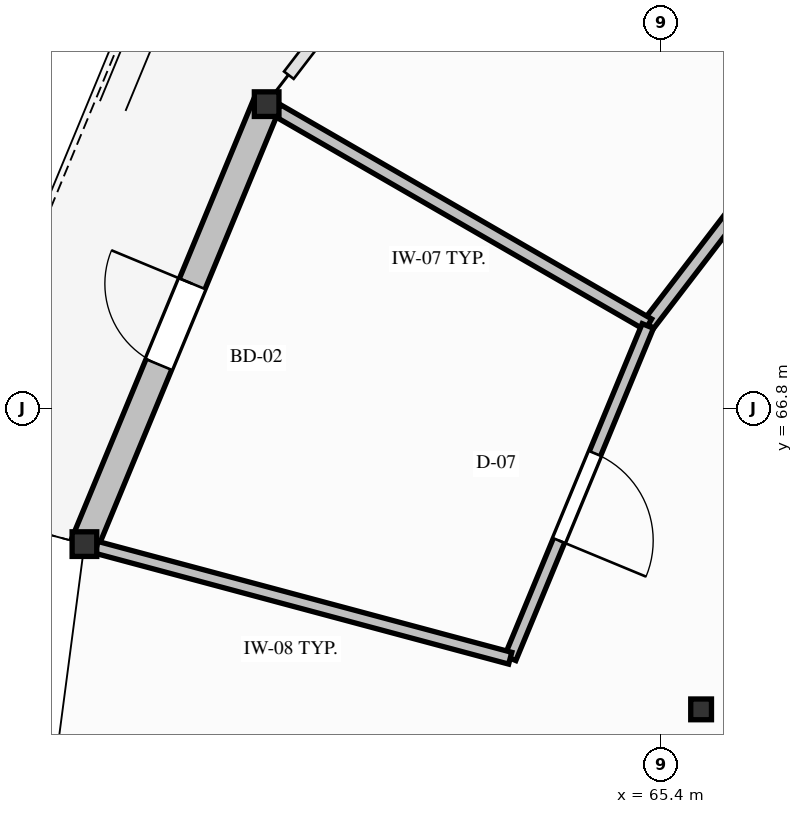
"""IFC4 building model, lengths in metres.
Left out: names, types, materials, properties, quantities, classifications, styles, units other than length and angle.
Written with IfcOpenShell. Run it as: python <this file> out.ifc"""

import sys

from ifc_helpers import new_model, si_unit, direction, frame, frame_2d, origin, origin_2d, place, context, subcontext, project, spatial, rectangle, hollow_circle, extrude, element, fill, save


model = new_model("IFC4")
c1 = context("Model", 3, precision=1e-05, world=origin(), true_north=direction((0.0, 1.0)))
c2 = subcontext(c1, "Body", "Model", "MODEL_VIEW")
j1 = project(units=[si_unit("LENGTHUNIT", "METRE"), si_unit("PLANEANGLEUNIT", "RADIAN")], contexts=[c1])
p1 = place(None, origin())
s1 = spatial("IfcSite", under=j1, at=p1, CompositionType="ELEMENT")
p2 = place(p1, origin())
s2 = spatial("IfcBuilding", under=s1, at=p2, CompositionType="ELEMENT")
p3 = place(p2, frame((0.0, 0.0, 9.0)))
s3 = spatial("IfcBuildingStorey", under=s2, at=p3, CompositionType="ELEMENT", Elevation=9.0)
for number, where, z_axis, x_axis in (
    (1, (60.215, 70.8, 0.0), (0.0, 0.0, 1.0), (1.0, 0.0, 0.0)),
    (2, (57.818, 65.012, 0.0), (0.0, 0.0, 1.0), (1.0, 0.0, 0.0)),
):
    element("IfcColumn", number, at=place(p3, frame(where, z_axis=z_axis, x_axis=x_axis)), inside=s3, PredefinedType="COLUMN", context=c2, shape_type="SweptSolid", body=[
        extrude(hollow_circle(Radius=0.162, WallThickness=0.016, at=origin_2d()), origin(), (0.0, 0.0, 1.0), 4.2),
    ])
p4 = place(p3, frame((65.932, 62.838, 0.0), z_axis=(0.0, 0.0, 1.0), x_axis=(1.0, 0.0, 0.0)))
e3 = element("IfcColumn", 3, at=p4, inside=s3, PredefinedType="COLUMN", context=c2, shape_type="SweptSolid", body=[
    extrude(hollow_circle(Radius=0.136, WallThickness=0.012, at=origin_2d()), origin(), (0.0, 0.0, 1.0), 4.2),
])
p5 = place(p3, frame((57.818, 65.012, 0.0), z_axis=(0.0, 0.0, 1.0), x_axis=(0.382663829839, 0.9238876519, 0.0)))
e4 = element("IfcWall", 4, at=p5, inside=s3, PredefinedType="SOLIDWALL", context=c2, shape_type="SweptSolid", body=[
    extrude(rectangle(XDim=6.265, YDim=0.365, at=frame_2d((3.133, 0.0))), origin(), (0.0, 0.0, 1.0), 3.538),
])
p6 = place(p5, frame((2.558, 0.0, 0.0)))
e5 = element("IfcOpeningElement", 5, at=p6, cuts=e4, PredefinedType="OPENING", context=c2, shape_type="SweptSolid", body=[
    extrude(rectangle(XDim=1.15, YDim=2.2, at=frame_2d((0.575, 1.1))), frame((0.0, 0.192, 0.0), z_axis=(0.0, -1.0, 0.0), x_axis=(1.0, 0.0, 0.0)), (0.0, 0.0, 1.0), 0.385),
])
p7 = place(p3, frame((68.131, 71.669, 0.0), z_axis=(0.0, 0.0, 1.0), x_axis=(-0.608769147025, -0.793347417989, 0.0)))
e6 = element("IfcWall", 6, at=p7, inside=s3, PredefinedType="PARTITIONING", context=c2, shape_type="SweptSolid", body=[
    extrude(rectangle(XDim=4.751, YDim=0.17, at=frame_2d((2.375, 0.0))), origin(), (0.0, 0.0, 1.0), 3.568),
])
p8 = place(p7, frame((1.826, 0.0, 0.0)))
e7 = element("IfcOpeningElement", 7, at=p8, cuts=e6, PredefinedType="OPENING", context=c2, shape_type="SweptSolid", body=[
    extrude(rectangle(XDim=1.18, YDim=2.2, at=frame_2d((0.59, 1.1))), frame((0.0, 0.095, 0.0), z_axis=(0.0, -1.0, 0.0), x_axis=(1.0, 0.0, 0.0)), (0.0, 0.0, 1.0), 0.19),
])
p9 = place(p3, frame((65.238, 67.9, 0.0), z_axis=(0.0, 0.0, 1.0), x_axis=(-0.866013897511, 0.50001992892, 0.0)))
e8 = element("IfcWall", 8, at=p9, inside=s3, PredefinedType="PARTITIONING", context=c2, shape_type="SweptSolid", body=[
    extrude(rectangle(XDim=5.636, YDim=0.17, at=frame_2d((2.818, 0.0))), origin(), (0.0, 0.0, 1.0), 3.538),
])
p10 = place(p3, frame((65.231, 67.881, 0.0), z_axis=(0.0, 0.0, 1.0), x_axis=(-0.382698170162, -0.923873427778, 0.0)))
e9 = element("IfcWall", 9, at=p10, inside=s3, PredefinedType="PARTITIONING", context=c2, shape_type="SweptSolid", body=[
    extrude(rectangle(XDim=4.731, YDim=0.16, at=frame_2d((2.365, 0.0))), origin(), (0.0, 0.0, 1.0), 3.568),
])
p11 = place(p10, frame((1.815, 0.0, 0.0)))
e10 = element("IfcOpeningElement", 10, at=p11, cuts=e9, PredefinedType="OPENING", context=c2, shape_type="SweptSolid", body=[
    extrude(rectangle(XDim=1.24, YDim=2.2, at=frame_2d((0.62, 1.1))), frame((0.0, 0.09, 0.0), z_axis=(0.0, -1.0, 0.0), x_axis=(1.0, 0.0, 0.0)), (0.0, 0.0, 1.0), 0.18),
])
p12 = place(p3, frame((63.42, 63.51, 0.0), z_axis=(0.0, 0.0, 1.0), x_axis=(-0.965922914043, 0.258829913508, 0.0)))
e11 = element("IfcWall", 11, at=p12, inside=s3, PredefinedType="PARTITIONING", context=c2, shape_type="SweptSolid", body=[
    extrude(rectangle(XDim=5.636, YDim=0.16, at=frame_2d((2.818, 0.0))), origin(), (0.0, 0.0, 1.0), 3.538),
])
p13 = place(p6, origin())
e12 = element("IfcDoor", 12, at=p13, inside=s3, OperationType="SINGLE_SWING_RIGHT", PredefinedType="DOOR", context=c2, shape_type="SweptSolid", body=[
    extrude(rectangle(XDim=1.15, YDim=2.2, at=frame_2d((0.575, 1.1))), frame((0.0, 0.025, 0.0), z_axis=(0.0, -1.0, 0.0), x_axis=(1.0, 0.0, 0.0)), (0.0, 0.0, 1.0), 0.05),
])
fill(e5, e12)
p14 = place(p11, origin())
e13 = element("IfcDoor", 13, at=p14, inside=s3, OperationType="SINGLE_SWING_RIGHT", PredefinedType="DOOR", context=c2, shape_type="SweptSolid", body=[
    extrude(rectangle(XDim=1.24, YDim=2.2, at=frame_2d((0.62, 1.1))), frame((0.0, 0.025, 0.0), z_axis=(0.0, -1.0, 0.0), x_axis=(1.0, 0.0, 0.0)), (0.0, 0.0, 1.0), 0.05),
])
fill(e10, e13)
save(model, sys.argv[1])
